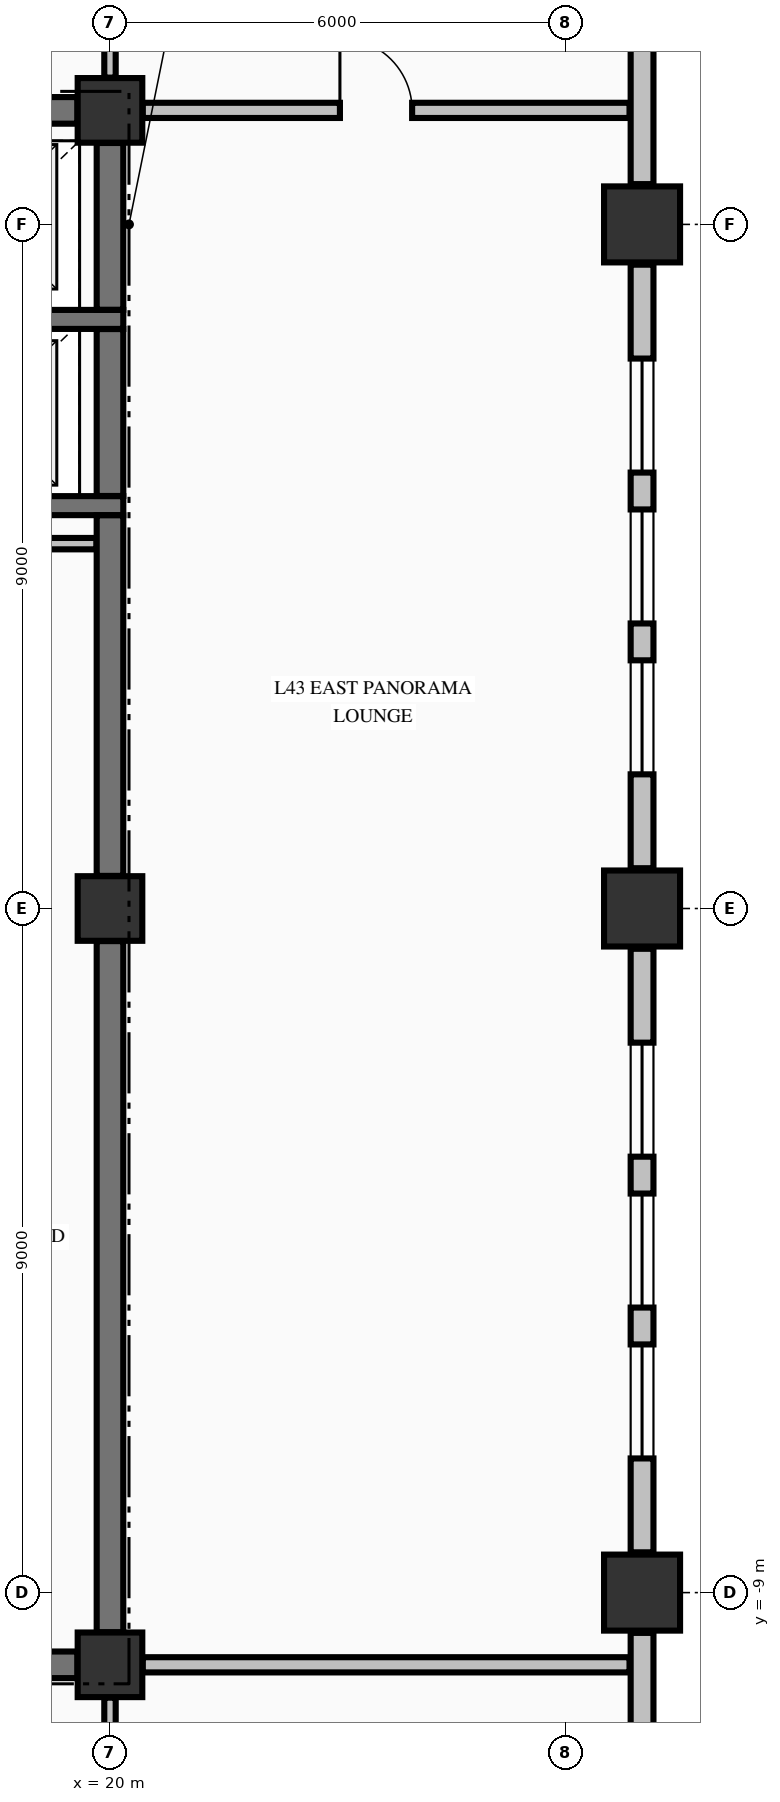
"""IFC4 building model, lengths in metres.
Left out: names, types, materials, properties, quantities, classifications, styles, units other than length and angle.
Written with IfcOpenShell. Run it as: python <this file> out.ifc"""

import sys

from ifc_helpers import new_model, si_unit, direction, frame, frame_2d, origin, origin_2d, place, context, subcontext, project, spatial, rectangle, extrude, element, fill, save


model = new_model("IFC4")
c1 = context("Model", 3, precision=1e-05, world=origin(), true_north=direction((0.0, 1.0)))
c2 = subcontext(c1, "Body", "Model", "MODEL_VIEW")
j1 = project(units=[si_unit("LENGTHUNIT", "METRE"), si_unit("PLANEANGLEUNIT", "RADIAN")], contexts=[c1])
p1 = place(None, origin())
s1 = spatial("IfcSite", under=j1, at=p1, CompositionType="ELEMENT")
p2 = place(p1, origin())
s2 = spatial("IfcBuilding", under=s1, at=p2, CompositionType="ELEMENT")
p3 = place(p2, frame((0.0, 0.0, 169.46)))
s3 = spatial("IfcBuildingStorey", under=s2, at=p3, CompositionType="ELEMENT", Elevation=169.46)
for number, where, z_axis, x_axis in (
    (1, (27.0, -9.0, -0.25), (0.0, 0.0, 1.0), (1.0, 0.0, 0.0)),
    (2, (27.0, 0.0, -0.25), (0.0, 0.0, 1.0), (1.0, 0.0, 0.0)),
    (3, (27.0, 9.0, -0.25), (0.0, 0.0, 1.0), (1.0, 0.0, 0.0)),
):
    element("IfcColumn", number, at=place(p3, frame(where, z_axis=z_axis, x_axis=x_axis)), inside=s3, PredefinedType="COLUMN", context=c2, shape_type="SweptSolid", body=[
        extrude(rectangle(XDim=1.0, YDim=1.0, at=origin_2d()), origin(), (0.0, 0.0, 1.0), 3.4),
    ])
for number, where, z_axis, x_axis in (
    (4, (20.0, -9.95, -0.25), (0.0, 0.0, 1.0), (1.0, 0.0, 0.0)),
    (5, (20.0, 10.5, -0.25), (0.0, 0.0, 1.0), (1.0, 0.0, 0.0)),
    (6, (20.0, 0.0, -0.25), (0.0, 0.0, 1.0), (1.0, 0.0, 0.0)),
):
    element("IfcColumn", number, at=place(p3, frame(where, z_axis=z_axis, x_axis=x_axis)), inside=s3, PredefinedType="COLUMN", context=c2, shape_type="SweptSolid", body=[
        extrude(rectangle(XDim=0.85, YDim=0.85, at=origin_2d()), origin(), (0.0, 0.0, 1.0), 3.4),
    ])
p4 = place(p3, frame((27.0, -18.97, 0.0), z_axis=(0.0, 0.0, 1.0), x_axis=(0.0, 1.0, 0.0)))
e7 = element("IfcWall", 7, at=p4, inside=s3, PredefinedType="STANDARD", context=c2, shape_type="SweptSolid", body=[
    extrude(rectangle(XDim=9.44, YDim=0.3, at=frame_2d((4.72, 0.0))), origin(), (0.0, 0.0, 1.0), 2.542),
])
p5 = place(p3, frame((27.0, -8.47, 0.0), z_axis=(0.0, 0.0, 1.0), x_axis=(0.0, 1.0, 0.0)))
e8 = element("IfcWall", 8, at=p5, inside=s3, PredefinedType="STANDARD", context=c2, shape_type="SweptSolid", body=[
    extrude(rectangle(XDim=7.94, YDim=0.3, at=frame_2d((3.97, 0.0))), origin(), (0.0, 0.0, 1.0), 2.542),
])
p6 = place(p5, frame((1.235, 0.0, 0.72)))
e9 = element("IfcOpeningElement", 9, at=p6, cuts=e8, PredefinedType="OPENING", context=c2, shape_type="SweptSolid", body=[
    extrude(rectangle(XDim=1.5, YDim=1.6, at=frame_2d((0.75, 0.8))), frame((0.0, 0.16, 0.0), z_axis=(0.0, -1.0, 0.0), x_axis=(1.0, 0.0, 0.0)), (0.0, 0.0, 1.0), 0.32),
])
p7 = place(p5, frame((3.22, 0.0, 0.72)))
e10 = element("IfcOpeningElement", 10, at=p7, cuts=e8, PredefinedType="OPENING", context=c2, shape_type="SweptSolid", body=[
    extrude(rectangle(XDim=1.5, YDim=1.6, at=frame_2d((0.75, 0.8))), frame((0.0, 0.16, 0.0), z_axis=(0.0, -1.0, 0.0), x_axis=(1.0, 0.0, 0.0)), (0.0, 0.0, 1.0), 0.32),
])
p8 = place(p5, frame((5.205, 0.0, 0.72)))
e11 = element("IfcOpeningElement", 11, at=p8, cuts=e8, PredefinedType="OPENING", context=c2, shape_type="SweptSolid", body=[
    extrude(rectangle(XDim=1.5, YDim=1.6, at=frame_2d((0.75, 0.8))), frame((0.0, 0.16, 0.0), z_axis=(0.0, -1.0, 0.0), x_axis=(1.0, 0.0, 0.0)), (0.0, 0.0, 1.0), 0.32),
])
p9 = place(p3, frame((27.0, 0.53, 0.0), z_axis=(0.0, 0.0, 1.0), x_axis=(0.0, 1.0, 0.0)))
e12 = element("IfcWall", 12, at=p9, inside=s3, PredefinedType="STANDARD", context=c2, shape_type="SweptSolid", body=[
    extrude(rectangle(XDim=7.94, YDim=0.3, at=frame_2d((3.97, 0.0))), origin(), (0.0, 0.0, 1.0), 2.542),
])
p10 = place(p9, frame((1.235, 0.0, 0.72)))
e13 = element("IfcOpeningElement", 13, at=p10, cuts=e12, PredefinedType="OPENING", context=c2, shape_type="SweptSolid", body=[
    extrude(rectangle(XDim=1.5, YDim=1.6, at=frame_2d((0.75, 0.8))), frame((0.0, 0.16, 0.0), z_axis=(0.0, -1.0, 0.0), x_axis=(1.0, 0.0, 0.0)), (0.0, 0.0, 1.0), 0.32),
])
p11 = place(p9, frame((3.22, 0.0, 0.72)))
e14 = element("IfcOpeningElement", 14, at=p11, cuts=e12, PredefinedType="OPENING", context=c2, shape_type="SweptSolid", body=[
    extrude(rectangle(XDim=1.5, YDim=1.6, at=frame_2d((0.75, 0.8))), frame((0.0, 0.16, 0.0), z_axis=(0.0, -1.0, 0.0), x_axis=(1.0, 0.0, 0.0)), (0.0, 0.0, 1.0), 0.32),
])
p12 = place(p9, frame((5.205, 0.0, 0.72)))
e15 = element("IfcOpeningElement", 15, at=p12, cuts=e12, PredefinedType="OPENING", context=c2, shape_type="SweptSolid", body=[
    extrude(rectangle(XDim=1.5, YDim=1.6, at=frame_2d((0.75, 0.8))), frame((0.0, 0.16, 0.0), z_axis=(0.0, -1.0, 0.0), x_axis=(1.0, 0.0, 0.0)), (0.0, 0.0, 1.0), 0.32),
])
p13 = place(p3, frame((27.0, 9.53, 0.0), z_axis=(0.0, 0.0, 1.0), x_axis=(0.0, 1.0, 0.0)))
e16 = element("IfcWall", 16, at=p13, inside=s3, PredefinedType="STANDARD", context=c2, shape_type="SweptSolid", body=[
    extrude(rectangle(XDim=9.44, YDim=0.3, at=frame_2d((4.72, 0.0))), origin(), (0.0, 0.0, 1.0), 2.542),
])
p14 = place(p3, frame((14.7, -9.95, 0.0), z_axis=(0.0, 0.0, 1.0), x_axis=(1.0, 0.0, 0.0)))
e17 = element("IfcWall", 17, at=p14, inside=s3, PredefinedType="SHEAR", context=c2, shape_type="SweptSolid", body=[
    extrude(rectangle(XDim=4.871, YDim=0.35, at=frame_2d((2.436, 0.0))), origin(), (0.0, 0.0, 1.0), 3.15),
])
p15 = place(p14, frame((0.85, 0.0, 0.0)))
e18 = element("IfcOpeningElement", 18, at=p15, cuts=e17, PredefinedType="OPENING", context=c2, shape_type="SweptSolid", body=[
    extrude(rectangle(XDim=0.9, YDim=2.15, at=frame_2d((0.45, 1.075))), frame((0.0, 0.185, 0.0), z_axis=(0.0, -1.0, 0.0), x_axis=(1.0, 0.0, 0.0)), (0.0, 0.0, 1.0), 0.37),
])
p16 = place(p14, frame((3.4, 0.0, 0.0)))
e19 = element("IfcOpeningElement", 19, at=p16, cuts=e17, PredefinedType="OPENING", context=c2, shape_type="SweptSolid", body=[
    extrude(rectangle(XDim=0.9, YDim=2.15, at=frame_2d((0.45, 1.075))), frame((0.0, 0.185, 0.0), z_axis=(0.0, -1.0, 0.0), x_axis=(1.0, 0.0, 0.0)), (0.0, 0.0, 1.0), 0.37),
])
for number, where, z_axis, x_axis in (
    (20, (17.025, 5.3, 0.0), (0.0, 0.0, 1.0), (1.0, 0.0, 0.0)),
    (21, (17.025, 7.75, 0.0), (0.0, 0.0, 1.0), (1.0, 0.0, 0.0)),
):
    element("IfcWall", number, at=place(p3, frame(where, z_axis=z_axis, x_axis=x_axis)), inside=s3, PredefinedType="SOLIDWALL", context=c2, shape_type="SweptSolid", body=[
        extrude(rectangle(XDim=3.15, YDim=0.25, at=frame_2d((1.575, 0.0))), origin(), (0.0, 0.0, 1.0), 3.15),
    ])
p17 = place(p3, frame((14.7, 10.5, 0.0), z_axis=(0.0, 0.0, 1.0), x_axis=(1.0, 0.0, 0.0)))
e22 = element("IfcWall", 22, at=p17, inside=s3, PredefinedType="SHEAR", context=c2, shape_type="SweptSolid", body=[
    extrude(rectangle(XDim=4.871, YDim=0.35, at=frame_2d((2.436, 0.0))), origin(), (0.0, 0.0, 1.0), 3.15),
])
p18 = place(p17, frame((0.7, 0.0, 0.0)))
e23 = element("IfcOpeningElement", 23, at=p18, cuts=e22, PredefinedType="OPENING", context=c2, shape_type="SweptSolid", body=[
    extrude(rectangle(XDim=1.1, YDim=2.15, at=frame_2d((0.55, 1.075))), frame((0.0, 0.185, 0.0), z_axis=(0.0, -1.0, 0.0), x_axis=(1.0, 0.0, 0.0)), (0.0, 0.0, 1.0), 0.37),
])
p19 = place(p3, frame((20.431, -9.95, 0.0), z_axis=(0.0, 0.0, 1.0), x_axis=(1.0, 0.0, 0.0)))
e24 = element("IfcWall", 24, at=p19, inside=s3, PredefinedType="PARTITIONING", context=c2, shape_type="SweptSolid", body=[
    extrude(rectangle(XDim=6.404, YDim=0.2, at=frame_2d((3.202, 0.0))), origin(), (0.0, 0.0, 1.0), 3.15),
])
p20 = place(p3, frame((14.878, 4.8, 0.0), z_axis=(0.0, 0.0, 1.0), x_axis=(1.0, 0.0, 0.0)))
e25 = element("IfcWall", 25, at=p20, inside=s3, PredefinedType="PARTITIONING", context=c2, shape_type="SweptSolid", body=[
    extrude(rectangle(XDim=4.944, YDim=0.15, at=frame_2d((2.472, 0.0))), origin(), (0.0, 0.0, 1.0), 3.15),
])
p21 = place(p3, frame((20.431, 10.5, 0.0), z_axis=(0.0, 0.0, 1.0), x_axis=(1.0, 0.0, 0.0)))
e26 = element("IfcWall", 26, at=p21, inside=s3, PredefinedType="PARTITIONING", context=c2, shape_type="SweptSolid", body=[
    extrude(rectangle(XDim=6.404, YDim=0.2, at=frame_2d((3.202, 0.0))), origin(), (0.0, 0.0, 1.0), 3.15),
])
p22 = place(p21, frame((2.594, 0.0, 0.0)))
e27 = element("IfcOpeningElement", 27, at=p22, cuts=e26, PredefinedType="OPENING", context=c2, shape_type="SweptSolid", body=[
    extrude(rectangle(XDim=0.95, YDim=2.15, at=frame_2d((0.475, 1.075))), frame((0.0, 0.11, 0.0), z_axis=(0.0, -1.0, 0.0), x_axis=(1.0, 0.0, 0.0)), (0.0, 0.0, 1.0), 0.22),
])
p23 = place(p3, frame((20.0, -9.521, 0.0), z_axis=(0.0, 0.0, 1.0), x_axis=(0.0, 1.0, 0.0)))
e28 = element("IfcWall", 28, at=p23, inside=s3, PredefinedType="SHEAR", context=c2, shape_type="SweptSolid", body=[
    extrude(rectangle(XDim=9.092, YDim=0.35, at=frame_2d((4.546, 0.0))), origin(), (0.0, 0.0, 1.0), 3.15),
])
p24 = place(p3, frame((20.0, 0.429, 0.0), z_axis=(0.0, 0.0, 1.0), x_axis=(0.0, 1.0, 0.0)))
e29 = element("IfcWall", 29, at=p24, inside=s3, PredefinedType="SHEAR", context=c2, shape_type="SweptSolid", body=[
    extrude(rectangle(XDim=4.744, YDim=0.35, at=frame_2d((2.372, 0.0))), origin(), (0.0, 0.0, 1.0), 3.15),
])
p25 = place(p3, frame((20.0, 5.427, 0.0), z_axis=(0.0, 0.0, 1.0), x_axis=(0.0, 1.0, 0.0)))
e30 = element("IfcWall", 30, at=p25, inside=s3, PredefinedType="SHEAR", context=c2, shape_type="SweptSolid", body=[
    extrude(rectangle(XDim=2.196, YDim=0.35, at=frame_2d((1.098, 0.0))), origin(), (0.0, 0.0, 1.0), 3.15),
])
p26 = place(p3, frame((20.0, 7.877, 0.0), z_axis=(0.0, 0.0, 1.0), x_axis=(0.0, 1.0, 0.0)))
e31 = element("IfcWall", 31, at=p26, inside=s3, PredefinedType="SHEAR", context=c2, shape_type="SweptSolid", body=[
    extrude(rectangle(XDim=2.194, YDim=0.35, at=frame_2d((1.097, 0.0))), origin(), (0.0, 0.0, 1.0), 3.15),
])
p27 = place(p3, frame((20.0, -12.697, 0.0), z_axis=(0.0, 0.0, 1.0), x_axis=(0.0, 1.0, 0.0)))
e32 = element("IfcWall", 32, at=p27, inside=s3, PredefinedType="PARTITIONING", context=c2, shape_type="SweptSolid", body=[
    extrude(rectangle(XDim=2.316, YDim=0.15, at=frame_2d((1.158, 0.0))), origin(), (0.0, 0.0, 1.0), 2.342),
])
p28 = place(p3, frame((20.0, 10.931, 0.0), z_axis=(0.0, 0.0, 1.0), x_axis=(0.0, 1.0, 0.0)))
e33 = element("IfcWall", 33, at=p28, inside=s3, PredefinedType="PARTITIONING", context=c2, shape_type="SweptSolid", body=[
    extrude(rectangle(XDim=2.316, YDim=0.15, at=frame_2d((1.158, 0.0))), origin(), (0.0, 0.0, 1.0), 2.342),
])
p29 = place(p28, frame((0.524, 0.0, 0.0)))
e34 = element("IfcOpeningElement", 34, at=p29, cuts=e33, PredefinedType="OPENING", context=c2, shape_type="SweptSolid", body=[
    extrude(rectangle(XDim=0.95, YDim=2.15, at=frame_2d((0.475, 1.075))), frame((0.0, 0.085, 0.0), z_axis=(0.0, -1.0, 0.0), x_axis=(1.0, 0.0, 0.0)), (0.0, 0.0, 1.0), 0.17),
])
p30 = place(p6, origin())
e35 = element("IfcWindow", 35, at=p30, inside=s3, PartitioningType="SINGLE_PANEL", PredefinedType="WINDOW", context=c2, shape_type="SweptSolid", body=[
    extrude(rectangle(XDim=1.5, YDim=1.6, at=frame_2d((0.75, 0.8))), frame((0.0, 0.03, 0.0), z_axis=(0.0, -1.0, 0.0), x_axis=(1.0, 0.0, 0.0)), (0.0, 0.0, 1.0), 0.06),
])
fill(e9, e35)
p31 = place(p7, origin())
e36 = element("IfcWindow", 36, at=p31, inside=s3, PartitioningType="SINGLE_PANEL", PredefinedType="WINDOW", context=c2, shape_type="SweptSolid", body=[
    extrude(rectangle(XDim=1.5, YDim=1.6, at=frame_2d((0.75, 0.8))), frame((0.0, 0.03, 0.0), z_axis=(0.0, -1.0, 0.0), x_axis=(1.0, 0.0, 0.0)), (0.0, 0.0, 1.0), 0.06),
])
fill(e10, e36)
p32 = place(p8, origin())
e37 = element("IfcWindow", 37, at=p32, inside=s3, PartitioningType="SINGLE_PANEL", PredefinedType="WINDOW", context=c2, shape_type="SweptSolid", body=[
    extrude(rectangle(XDim=1.5, YDim=1.6, at=frame_2d((0.75, 0.8))), frame((0.0, 0.03, 0.0), z_axis=(0.0, -1.0, 0.0), x_axis=(1.0, 0.0, 0.0)), (0.0, 0.0, 1.0), 0.06),
])
fill(e11, e37)
p33 = place(p10, origin())
e38 = element("IfcWindow", 38, at=p33, inside=s3, PartitioningType="SINGLE_PANEL", PredefinedType="WINDOW", context=c2, shape_type="SweptSolid", body=[
    extrude(rectangle(XDim=1.5, YDim=1.6, at=frame_2d((0.75, 0.8))), frame((0.0, 0.03, 0.0), z_axis=(0.0, -1.0, 0.0), x_axis=(1.0, 0.0, 0.0)), (0.0, 0.0, 1.0), 0.06),
])
fill(e13, e38)
p34 = place(p11, origin())
e39 = element("IfcWindow", 39, at=p34, inside=s3, PartitioningType="SINGLE_PANEL", PredefinedType="WINDOW", context=c2, shape_type="SweptSolid", body=[
    extrude(rectangle(XDim=1.5, YDim=1.6, at=frame_2d((0.75, 0.8))), frame((0.0, 0.03, 0.0), z_axis=(0.0, -1.0, 0.0), x_axis=(1.0, 0.0, 0.0)), (0.0, 0.0, 1.0), 0.06),
])
fill(e14, e39)
p35 = place(p12, origin())
e40 = element("IfcWindow", 40, at=p35, inside=s3, PartitioningType="SINGLE_PANEL", PredefinedType="WINDOW", context=c2, shape_type="SweptSolid", body=[
    extrude(rectangle(XDim=1.5, YDim=1.6, at=frame_2d((0.75, 0.8))), frame((0.0, 0.03, 0.0), z_axis=(0.0, -1.0, 0.0), x_axis=(1.0, 0.0, 0.0)), (0.0, 0.0, 1.0), 0.06),
])
fill(e15, e40)
p36 = place(p22, origin())
e41 = element("IfcDoor", 41, at=p36, inside=s3, OperationType="SINGLE_SWING_LEFT", PredefinedType="DOOR", context=c2, shape_type="SweptSolid", body=[
    extrude(rectangle(XDim=0.95, YDim=2.15, at=frame_2d((0.475, 1.075))), frame((0.0, 0.025, 0.0), z_axis=(0.0, -1.0, 0.0), x_axis=(1.0, 0.0, 0.0)), (0.0, 0.0, 1.0), 0.05),
])
fill(e27, e41)
save(model, sys.argv[1])
